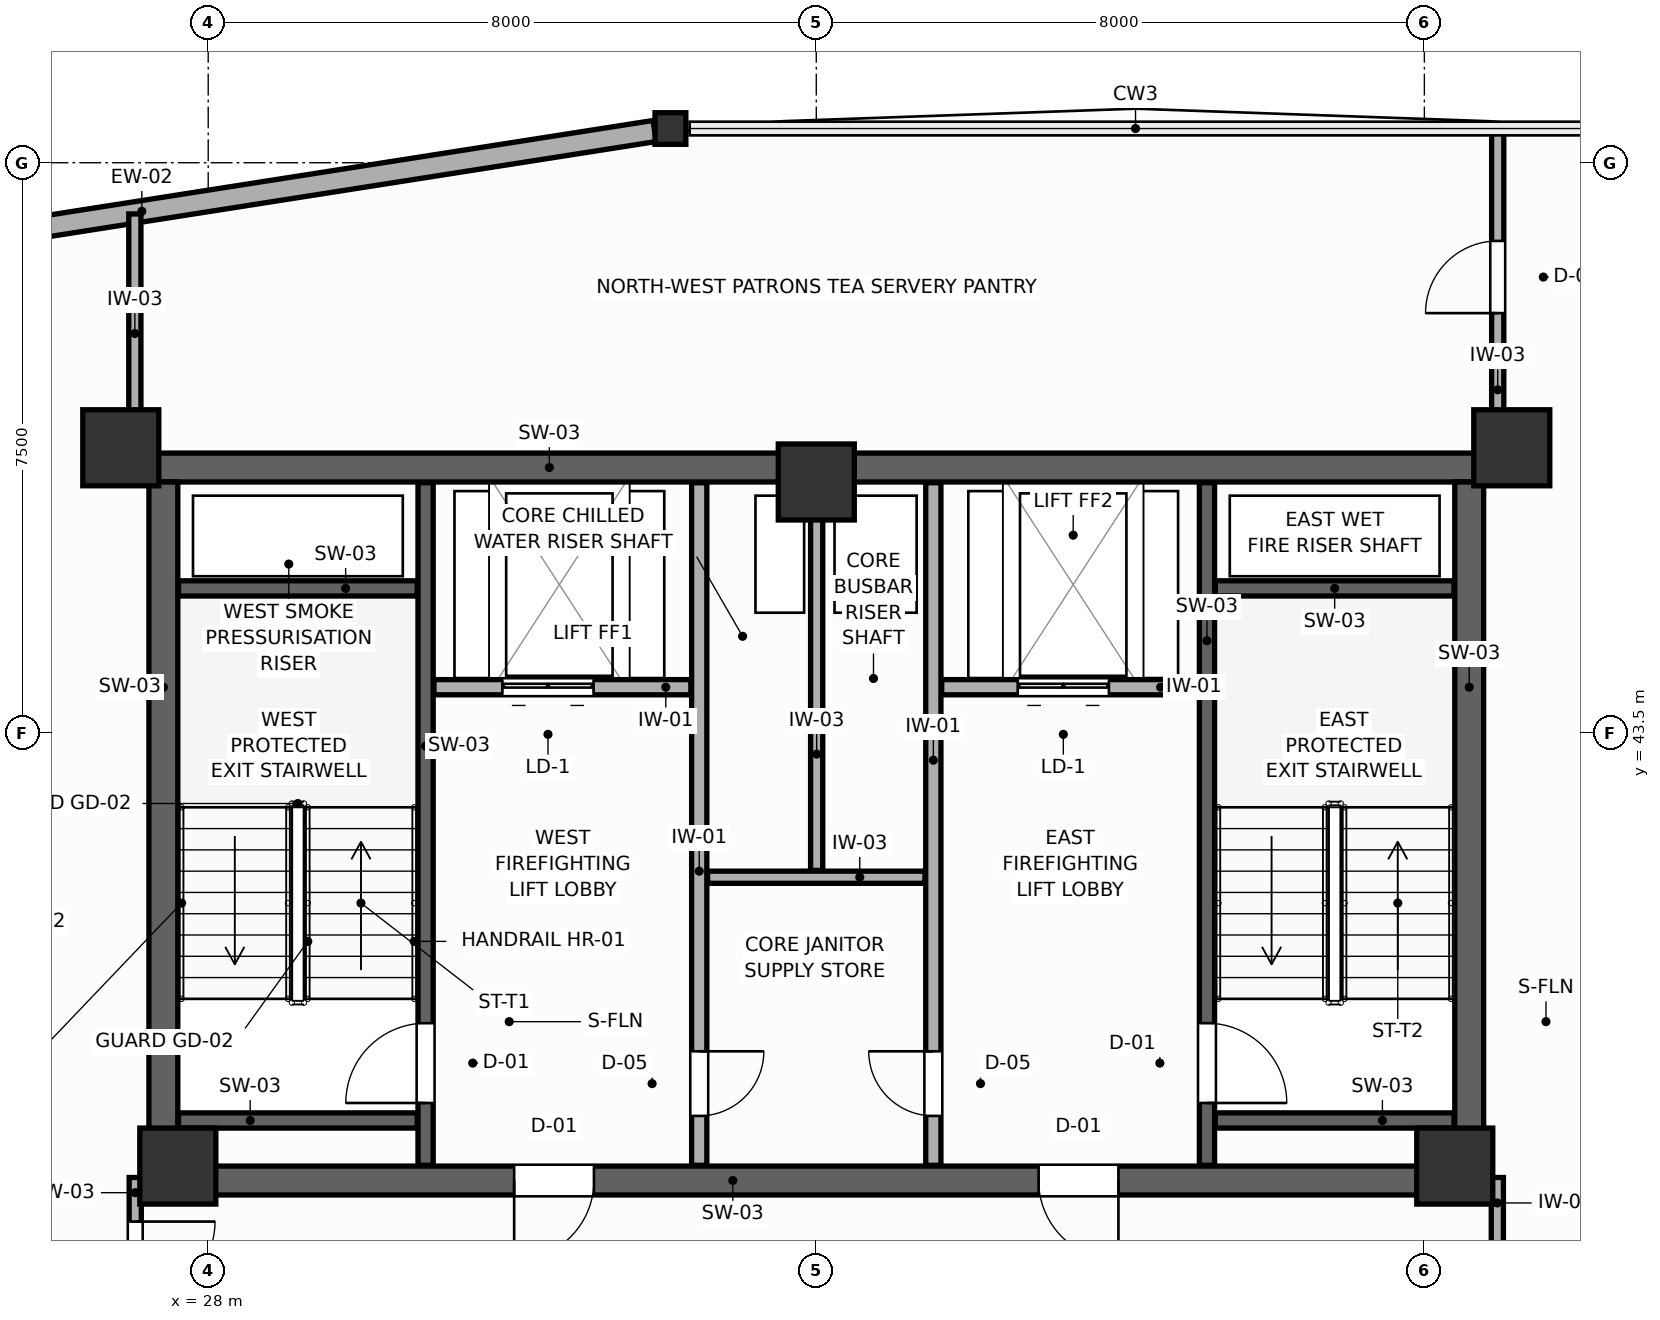
"""IFC4 building model, lengths in metres.
Left out: names, types, materials, properties, quantities, classifications, styles, units other than length and angle.
Written with IfcOpenShell. Run it as: python <this file> out.ifc"""

import sys

from ifc_helpers import new_model, si_unit, direction, frame, frame_2d, origin, origin_2d, place, context, subcontext, project, spatial, rectangle, i_section, extrude, source, transform, mapped, element, fill, save


model = new_model("IFC4")
c1 = context("Model", 3, precision=1e-05, world=origin(), true_north=direction((0.0, 1.0)))
c2 = subcontext(c1, "Body", "Model", "MODEL_VIEW")
j1 = project(units=[si_unit("LENGTHUNIT", "METRE"), si_unit("PLANEANGLEUNIT", "RADIAN")], contexts=[c1])
p1 = place(None, origin())
s1 = spatial("IfcSite", under=j1, at=p1, CompositionType="ELEMENT")
p2 = place(p1, origin())
s2 = spatial("IfcBuilding", under=s1, at=p2, CompositionType="ELEMENT")
p3 = place(p2, frame((0.0, 0.0, 223.8)))
s3 = spatial("IfcBuildingStorey", under=s2, at=p3, CompositionType="ELEMENT", Elevation=223.8)
p4 = place(p3, frame((27.22, 46.99, 0.0), z_axis=(0.0, 0.0, 1.0), x_axis=(1.0, 0.0, 0.0)))
e1 = element("IfcWall", 1, at=p4, inside=s3, PredefinedType="SHEAR", context=c2, shape_type="SweptSolid", body=[
    extrude(rectangle(XDim=17.56, YDim=0.38, at=frame_2d((8.78, 0.0))), origin(), (0.0, 0.0, 1.0), 3.6),
])
p5 = place(p3, frame((27.22, 37.61, 0.0), z_axis=(0.0, 0.0, 1.0), x_axis=(1.0, 0.0, 0.0)))
e2 = element("IfcWall", 2, at=p5, inside=s3, PredefinedType="SHEAR", context=c2, shape_type="SweptSolid", body=[
    extrude(rectangle(XDim=17.56, YDim=0.38, at=frame_2d((8.78, 0.0))), origin(), (0.0, 0.0, 1.0), 3.6),
])
p6 = place(p5, frame((4.805, 0.0, 0.0)))
e3 = element("IfcOpeningElement", 3, at=p6, cuts=e2, PredefinedType="OPENING", context=c2, shape_type="SweptSolid", body=[
    extrude(rectangle(XDim=1.05, YDim=2.1, at=frame_2d((0.525, 1.05))), frame((0.0, 0.2, 0.0), z_axis=(0.0, -1.0, 0.0), x_axis=(1.0, 0.0, 0.0)), (0.0, 0.0, 1.0), 0.4),
])
p7 = place(p5, frame((11.705, 0.0, 0.0)))
e4 = element("IfcOpeningElement", 4, at=p7, cuts=e2, PredefinedType="OPENING", context=c2, shape_type="SweptSolid", body=[
    extrude(rectangle(XDim=1.05, YDim=2.1, at=frame_2d((0.525, 1.05))), frame((0.0, 0.2, 0.0), z_axis=(0.0, -1.0, 0.0), x_axis=(1.0, 0.0, 0.0)), (0.0, 0.0, 1.0), 0.4),
])
for number, where, z_axis, x_axis in (
    (5, (27.41, 37.8, 0.0), (0.0, 0.0, 1.0), (0.0, 1.0, 0.0)),
    (6, (44.59, 37.8, 0.0), (0.0, 0.0, 1.0), (0.0, 1.0, 0.0)),
):
    element("IfcWall", number, at=place(p3, frame(where, z_axis=z_axis, x_axis=x_axis)), inside=s3, PredefinedType="SHEAR", context=c2, shape_type="SweptSolid", body=[
        extrude(rectangle(XDim=9.0, YDim=0.38, at=frame_2d((4.5, 0.0))), origin(), (0.0, 0.0, 1.0), 3.6),
    ])
m1 = source(origin(), c2, "Body", "SweptSolid", [
    extrude(rectangle(XDim=1.0, YDim=1.0, at=origin_2d()), origin(), (0.0, 0.0, 1.0), 3.6),
])
for number, where, z_axis, x_axis in (
    (7, (26.85, 47.25, 0.0), (0.0, 0.0, 1.0), (1.0, 0.0, 0.0)),
    (8, (45.15, 47.25, 0.0), (0.0, 0.0, 1.0), (1.0, 0.0, 0.0)),
    (9, (27.6, 37.8, 0.0), (0.0, 0.0, 1.0), (1.0, 0.0, 0.0)),
    (10, (44.4, 37.8, 0.0), (0.0, 0.0, 1.0), (1.0, 0.0, 0.0)),
    (11, (36.0, 46.8, 0.0), (0.0, 0.0, 1.0), (1.0, 0.0, 0.0)),
):
    element("IfcColumn", number, at=place(p3, frame(where, z_axis=z_axis, x_axis=x_axis)), inside=s3, PredefinedType="COLUMN", context=c2, shape_type="MappedRepresentation", body=[
        mapped(m1, transform((0.0, 0.0, 0.0), scale=1.0)),
    ])
m2 = source(origin(), c2, "Body", "SweptSolid", [
    extrude(i_section(OverallWidth=0.406, OverallDepth=0.416, WebThickness=0.027, FlangeThickness=0.044, FilletRadius=0.015, at=origin_2d()), origin(), (0.0, 0.0, 1.0), 3.6),
])
p8 = place(p3, frame((34.081, 51.45, 0.0), z_axis=(0.0, 0.0, 1.0), x_axis=(1.0, 0.0, 0.0)))
e12 = element("IfcColumn", 12, at=p8, inside=s3, PredefinedType="COLUMN", context=c2, shape_type="MappedRepresentation", body=[
    mapped(m2, transform((0.0, 0.0, 0.0), scale=1.0)),
])
p9 = place(p3, frame((33.873, 51.417, 0.0), z_axis=(0.0, 0.0, 1.0), x_axis=(-0.987957437721, -0.154725890697, 0.0)))
e13 = element("IfcWall", 13, at=p9, inside=s3, PredefinedType="SOLIDWALL", context=c2, shape_type="SweptSolid", body=[
    extrude(rectangle(XDim=13.657, YDim=0.28, at=frame_2d((6.828, 0.0))), origin(), (0.0, 0.0, 1.0), 1.88),
])
p10 = place(p3, frame((30.86, 37.81, 0.0), z_axis=(0.0, 0.0, 1.0), x_axis=(0.0, 1.0, 0.0)))
e14 = element("IfcWall", 14, at=p10, inside=s3, PredefinedType="SHEAR", context=c2, shape_type="SweptSolid", body=[
    extrude(rectangle(XDim=8.98, YDim=0.2, at=frame_2d((4.49, 0.0))), origin(), (0.0, 0.0, 1.0), 3.6),
])
p11 = place(p10, frame((0.82, 0.0, 0.0)))
e15 = element("IfcOpeningElement", 15, at=p11, cuts=e14, PredefinedType="OPENING", context=c2, shape_type="SweptSolid", body=[
    extrude(rectangle(XDim=1.05, YDim=2.1, at=frame_2d((0.525, 1.05))), frame((0.0, 0.11, 0.0), z_axis=(0.0, -1.0, 0.0), x_axis=(1.0, 0.0, 0.0)), (0.0, 0.0, 1.0), 0.22),
])
for number, where, z_axis, x_axis in (
    (16, (27.61, 45.4, 0.0), (0.0, 0.0, 1.0), (1.0, 0.0, 0.0)),
    (17, (27.61, 38.4, 0.0), (0.0, 0.0, 1.0), (1.0, 0.0, 0.0)),
):
    element("IfcWall", number, at=place(p3, frame(where, z_axis=z_axis, x_axis=x_axis)), inside=s3, PredefinedType="SHEAR", context=c2, shape_type="SweptSolid", body=[
        extrude(rectangle(XDim=3.14, YDim=0.2, at=frame_2d((1.57, 0.0))), origin(), (0.0, 0.0, 1.0), 3.6),
    ])
p12 = place(p3, frame((41.14, 37.81, 0.0), z_axis=(0.0, 0.0, 1.0), x_axis=(0.0, 1.0, 0.0)))
e18 = element("IfcWall", 18, at=p12, inside=s3, PredefinedType="SHEAR", context=c2, shape_type="SweptSolid", body=[
    extrude(rectangle(XDim=8.98, YDim=0.2, at=frame_2d((4.49, 0.0))), origin(), (0.0, 0.0, 1.0), 3.6),
])
p13 = place(p12, frame((0.82, 0.0, 0.0)))
e19 = element("IfcOpeningElement", 19, at=p13, cuts=e18, PredefinedType="OPENING", context=c2, shape_type="SweptSolid", body=[
    extrude(rectangle(XDim=1.05, YDim=2.1, at=frame_2d((0.525, 1.05))), frame((0.0, 0.11, 0.0), z_axis=(0.0, -1.0, 0.0), x_axis=(1.0, 0.0, 0.0)), (0.0, 0.0, 1.0), 0.22),
])
for number, where, z_axis, x_axis in (
    (20, (41.25, 45.4, 0.0), (0.0, 0.0, 1.0), (1.0, 0.0, 0.0)),
    (21, (41.25, 38.4, 0.0), (0.0, 0.0, 1.0), (1.0, 0.0, 0.0)),
):
    element("IfcWall", number, at=place(p3, frame(where, z_axis=z_axis, x_axis=x_axis)), inside=s3, PredefinedType="SHEAR", context=c2, shape_type="SweptSolid", body=[
        extrude(rectangle(XDim=3.14, YDim=0.2, at=frame_2d((1.57, 0.0))), origin(), (0.0, 0.0, 1.0), 3.6),
    ])
p14 = place(p3, frame((30.97, 44.1, 0.0), z_axis=(0.0, 0.0, 1.0), x_axis=(1.0, 0.0, 0.0)))
e22 = element("IfcWall", 22, at=p14, inside=s3, PredefinedType="PARTITIONING", context=c2, shape_type="SweptSolid", body=[
    extrude(rectangle(XDim=3.38, YDim=0.2, at=frame_2d((1.69, 0.0))), origin(), (0.0, 0.0, 1.0), 3.41),
])
p15 = place(p14, frame((0.9, 0.0, 0.0)))
e23 = element("IfcOpeningElement", 23, at=p15, cuts=e22, PredefinedType="OPENING", context=c2, shape_type="SweptSolid", body=[
    extrude(rectangle(XDim=1.2, YDim=2.1, at=frame_2d((0.6, 1.05))), frame((0.0, 0.11, 0.0), z_axis=(0.0, -1.0, 0.0), x_axis=(1.0, 0.0, 0.0)), (0.0, 0.0, 1.0), 0.22),
])
p16 = place(p3, frame((37.65, 44.1, 0.0), z_axis=(0.0, 0.0, 1.0), x_axis=(1.0, 0.0, 0.0)))
e24 = element("IfcWall", 24, at=p16, inside=s3, PredefinedType="PARTITIONING", context=c2, shape_type="SweptSolid", body=[
    extrude(rectangle(XDim=3.38, YDim=0.2, at=frame_2d((1.69, 0.0))), origin(), (0.0, 0.0, 1.0), 3.41),
])
p17 = place(p16, frame((1.0, 0.0, 0.0)))
e25 = element("IfcOpeningElement", 25, at=p17, cuts=e24, PredefinedType="OPENING", context=c2, shape_type="SweptSolid", body=[
    extrude(rectangle(XDim=1.2, YDim=2.1, at=frame_2d((0.6, 1.05))), frame((0.0, 0.11, 0.0), z_axis=(0.0, -1.0, 0.0), x_axis=(1.0, 0.0, 0.0)), (0.0, 0.0, 1.0), 0.22),
])
p18 = place(p3, frame((34.46, 37.81, 0.0), z_axis=(0.0, 0.0, 1.0), x_axis=(0.0, 1.0, 0.0)))
e26 = element("IfcWall", 26, at=p18, inside=s3, PredefinedType="PARTITIONING", context=c2, shape_type="SweptSolid", body=[
    extrude(rectangle(XDim=8.98, YDim=0.2, at=frame_2d((4.49, 0.0))), origin(), (0.0, 0.0, 1.0), 3.41),
])
p19 = place(p18, frame((0.65, 0.0, 0.0)))
e27 = element("IfcOpeningElement", 27, at=p19, cuts=e26, PredefinedType="OPENING", context=c2, shape_type="SweptSolid", body=[
    extrude(rectangle(XDim=0.85, YDim=2.05, at=frame_2d((0.425, 1.025))), frame((0.0, 0.11, 0.0), z_axis=(0.0, -1.0, 0.0), x_axis=(1.0, 0.0, 0.0)), (0.0, 0.0, 1.0), 0.22),
])
p20 = place(p3, frame((37.54, 37.81, 0.0), z_axis=(0.0, 0.0, 1.0), x_axis=(0.0, 1.0, 0.0)))
e28 = element("IfcWall", 28, at=p20, inside=s3, PredefinedType="PARTITIONING", context=c2, shape_type="SweptSolid", body=[
    extrude(rectangle(XDim=8.98, YDim=0.2, at=frame_2d((4.49, 0.0))), origin(), (0.0, 0.0, 1.0), 3.41),
])
p21 = place(p20, frame((0.65, 0.0, 0.0)))
e29 = element("IfcOpeningElement", 29, at=p21, cuts=e28, PredefinedType="OPENING", context=c2, shape_type="SweptSolid", body=[
    extrude(rectangle(XDim=0.85, YDim=2.05, at=frame_2d((0.425, 1.025))), frame((0.0, 0.11, 0.0), z_axis=(0.0, -1.0, 0.0), x_axis=(1.0, 0.0, 0.0)), (0.0, 0.0, 1.0), 0.22),
])
p22 = place(p3, frame((34.57, 41.6, 0.0), z_axis=(0.0, 0.0, 1.0), x_axis=(1.0, 0.0, 0.0)))
e30 = element("IfcWall", 30, at=p22, inside=s3, PredefinedType="PARTITIONING", context=c2, shape_type="SweptSolid", body=[
    extrude(rectangle(XDim=2.86, YDim=0.16, at=frame_2d((1.43, 0.0))), origin(), (0.0, 0.0, 1.0), 3.41),
])
p23 = place(p3, frame((36.005, 41.69, 0.0), z_axis=(0.0, 0.0, 1.0), x_axis=(0.0, 1.0, 0.0)))
e31 = element("IfcWall", 31, at=p23, inside=s3, PredefinedType="PARTITIONING", context=c2, shape_type="SweptSolid", body=[
    extrude(rectangle(XDim=5.1, YDim=0.16, at=frame_2d((2.55, 0.0))), origin(), (0.0, 0.0, 1.0), 3.41),
])
p24 = place(p3, frame((27.04, 35.54, 0.0), z_axis=(0.0, 0.0, 1.0), x_axis=(0.0, 1.0, 0.0)))
e32 = element("IfcWall", 32, at=p24, inside=s3, PredefinedType="PARTITIONING", context=c2, shape_type="SweptSolid", body=[
    extrude(rectangle(XDim=2.11, YDim=0.16, at=frame_2d((1.055, 0.0))), origin(), (0.0, 0.0, 1.0), 3.41),
])
p25 = place(p24, frame((0.48, 0.0, 0.0)))
e33 = element("IfcOpeningElement", 33, at=p25, cuts=e32, PredefinedType="OPENING", context=c2, shape_type="SweptSolid", body=[
    extrude(rectangle(XDim=1.05, YDim=2.1, at=frame_2d((0.525, 1.05))), frame((0.0, 0.09, 0.0), z_axis=(0.0, -1.0, 0.0), x_axis=(1.0, 0.0, 0.0)), (0.0, 0.0, 1.0), 0.18),
])
p26 = place(p3, frame((44.96, 35.0, 0.0), z_axis=(0.0, 0.0, 1.0), x_axis=(0.0, 1.0, 0.0)))
e34 = element("IfcWall", 34, at=p26, inside=s3, PredefinedType="PARTITIONING", context=c2, shape_type="SweptSolid", body=[
    extrude(rectangle(XDim=2.65, YDim=0.16, at=frame_2d((1.325, 0.0))), origin(), (0.0, 0.0, 1.0), 3.41),
])
p27 = place(p26, frame((0.75, 0.0, 0.0)))
e35 = element("IfcOpeningElement", 35, at=p27, cuts=e34, PredefinedType="OPENING", context=c2, shape_type="SweptSolid", body=[
    extrude(rectangle(XDim=1.05, YDim=2.1, at=frame_2d((0.525, 1.05))), frame((0.0, 0.09, 0.0), z_axis=(0.0, -1.0, 0.0), x_axis=(1.0, 0.0, 0.0)), (0.0, 0.0, 1.0), 0.18),
])
p28 = place(p3, frame((44.965, 47.183, 0.0), z_axis=(0.0, 0.0, 1.0), x_axis=(0.0, 1.0, 0.0)))
e36 = element("IfcWall", 36, at=p28, inside=s3, PredefinedType="PARTITIONING", context=c2, shape_type="SweptSolid", body=[
    extrude(rectangle(XDim=4.247, YDim=0.16, at=frame_2d((2.124, 0.0))), origin(), (0.0, 0.0, 1.0), 2.17),
])
p29 = place(p28, frame((1.838, 0.0, 0.0)))
e37 = element("IfcOpeningElement", 37, at=p29, cuts=e36, PredefinedType="OPENING", context=c2, shape_type="SweptSolid", body=[
    extrude(rectangle(XDim=0.95, YDim=2.05, at=frame_2d((0.475, 1.025))), frame((0.0, 0.09, 0.0), z_axis=(0.0, -1.0, 0.0), x_axis=(1.0, 0.0, 0.0)), (0.0, 0.0, 1.0), 0.18),
])
p30 = place(p3, frame((27.035, 47.18, 0.0), z_axis=(0.0, 0.0, 1.0), x_axis=(0.0, 1.0, 0.0)))
e38 = element("IfcWall", 38, at=p30, inside=s3, PredefinedType="PARTITIONING", context=c2, shape_type="SweptSolid", body=[
    extrude(rectangle(XDim=3.146, YDim=0.16, at=frame_2d((1.573, 0.0))), origin(), (0.0, 0.0, 1.0), 3.41),
])
p31 = place(p11, origin())
e39 = element("IfcDoor", 39, at=p31, inside=s3, OperationType="SINGLE_SWING_LEFT", PredefinedType="DOOR", context=c2, shape_type="SweptSolid", body=[
    extrude(rectangle(XDim=1.05, YDim=2.1, at=frame_2d((0.525, 1.05))), frame((0.0, 0.025, 0.0), z_axis=(0.0, -1.0, 0.0), x_axis=(1.0, 0.0, 0.0)), (0.0, 0.0, 1.0), 0.05),
])
fill(e15, e39)
p32 = place(p13, frame((1.05, 0.0, 0.0), z_axis=(0.0, 0.0, 1.0), x_axis=(-1.0, 0.0, 0.0)))
e40 = element("IfcDoor", 40, at=p32, inside=s3, OperationType="SINGLE_SWING_RIGHT", PredefinedType="DOOR", context=c2, shape_type="SweptSolid", body=[
    extrude(rectangle(XDim=1.05, YDim=2.1, at=frame_2d((0.525, 1.05))), frame((0.0, 0.025, 0.0), z_axis=(0.0, -1.0, 0.0), x_axis=(1.0, 0.0, 0.0)), (0.0, 0.0, 1.0), 0.05),
])
fill(e19, e40)
p33 = place(p15, origin())
e41 = element("IfcDoor", 41, at=p33, inside=s3, OperationType="DOUBLE_DOOR_SLIDING", PredefinedType="DOOR", context=c2, shape_type="SweptSolid", body=[
    extrude(rectangle(XDim=1.2, YDim=2.1, at=frame_2d((0.6, 1.05))), frame((0.0, 0.025, 0.0), z_axis=(0.0, -1.0, 0.0), x_axis=(1.0, 0.0, 0.0)), (0.0, 0.0, 1.0), 0.05),
])
fill(e23, e41)
p34 = place(p17, origin())
e42 = element("IfcDoor", 42, at=p34, inside=s3, OperationType="DOUBLE_DOOR_SLIDING", PredefinedType="DOOR", context=c2, shape_type="SweptSolid", body=[
    extrude(rectangle(XDim=1.2, YDim=2.1, at=frame_2d((0.6, 1.05))), frame((0.0, 0.025, 0.0), z_axis=(0.0, -1.0, 0.0), x_axis=(1.0, 0.0, 0.0)), (0.0, 0.0, 1.0), 0.05),
])
fill(e25, e42)
p35 = place(p19, frame((0.85, 0.0, 0.0), z_axis=(0.0, 0.0, 1.0), x_axis=(-1.0, 0.0, 0.0)))
e43 = element("IfcDoor", 43, at=p35, inside=s3, OperationType="SINGLE_SWING_LEFT", PredefinedType="DOOR", context=c2, shape_type="SweptSolid", body=[
    extrude(rectangle(XDim=0.85, YDim=2.05, at=frame_2d((0.425, 1.025))), frame((0.0, 0.025, 0.0), z_axis=(0.0, -1.0, 0.0), x_axis=(1.0, 0.0, 0.0)), (0.0, 0.0, 1.0), 0.05),
])
fill(e27, e43)
p36 = place(p21, origin())
e44 = element("IfcDoor", 44, at=p36, inside=s3, OperationType="SINGLE_SWING_RIGHT", PredefinedType="DOOR", context=c2, shape_type="SweptSolid", body=[
    extrude(rectangle(XDim=0.85, YDim=2.05, at=frame_2d((0.425, 1.025))), frame((0.0, 0.025, 0.0), z_axis=(0.0, -1.0, 0.0), x_axis=(1.0, 0.0, 0.0)), (0.0, 0.0, 1.0), 0.05),
])
fill(e29, e44)
p37 = place(p25, frame((1.05, 0.0, 0.0), z_axis=(0.0, 0.0, 1.0), x_axis=(-1.0, 0.0, 0.0)))
e45 = element("IfcDoor", 45, at=p37, inside=s3, OperationType="SINGLE_SWING_LEFT", PredefinedType="DOOR", context=c2, shape_type="SweptSolid", body=[
    extrude(rectangle(XDim=1.05, YDim=2.1, at=frame_2d((0.525, 1.05))), frame((0.0, 0.025, 0.0), z_axis=(0.0, -1.0, 0.0), x_axis=(1.0, 0.0, 0.0)), (0.0, 0.0, 1.0), 0.05),
])
fill(e33, e45)
p38 = place(p29, origin())
e46 = element("IfcDoor", 46, at=p38, inside=s3, OperationType="SINGLE_SWING_LEFT", PredefinedType="DOOR", context=c2, shape_type="SweptSolid", body=[
    extrude(rectangle(XDim=0.95, YDim=2.05, at=frame_2d((0.475, 1.025))), frame((0.0, 0.025, 0.0), z_axis=(0.0, -1.0, 0.0), x_axis=(1.0, 0.0, 0.0)), (0.0, 0.0, 1.0), 0.05),
])
fill(e37, e46)
p39 = place(p6, frame((1.05, 0.0, 0.0), z_axis=(0.0, 0.0, 1.0), x_axis=(-1.0, 0.0, 0.0)))
e47 = element("IfcDoor", 47, at=p39, inside=s3, OperationType="SINGLE_SWING_RIGHT", PredefinedType="DOOR", context=c2, shape_type="SweptSolid", body=[
    extrude(rectangle(XDim=1.05, YDim=2.1, at=frame_2d((0.525, 1.05))), frame((0.0, 0.025, 0.0), z_axis=(0.0, -1.0, 0.0), x_axis=(1.0, 0.0, 0.0)), (0.0, 0.0, 1.0), 0.05),
])
fill(e3, e47)
p40 = place(p7, frame((1.05, 0.0, 0.0), z_axis=(0.0, 0.0, 1.0), x_axis=(-1.0, 0.0, 0.0)))
e48 = element("IfcDoor", 48, at=p40, inside=s3, OperationType="SINGLE_SWING_LEFT", PredefinedType="DOOR", context=c2, shape_type="SweptSolid", body=[
    extrude(rectangle(XDim=1.05, YDim=2.1, at=frame_2d((0.525, 1.05))), frame((0.0, 0.025, 0.0), z_axis=(0.0, -1.0, 0.0), x_axis=(1.0, 0.0, 0.0)), (0.0, 0.0, 1.0), 0.05),
])
fill(e4, e48)
save(model, sys.argv[1])
